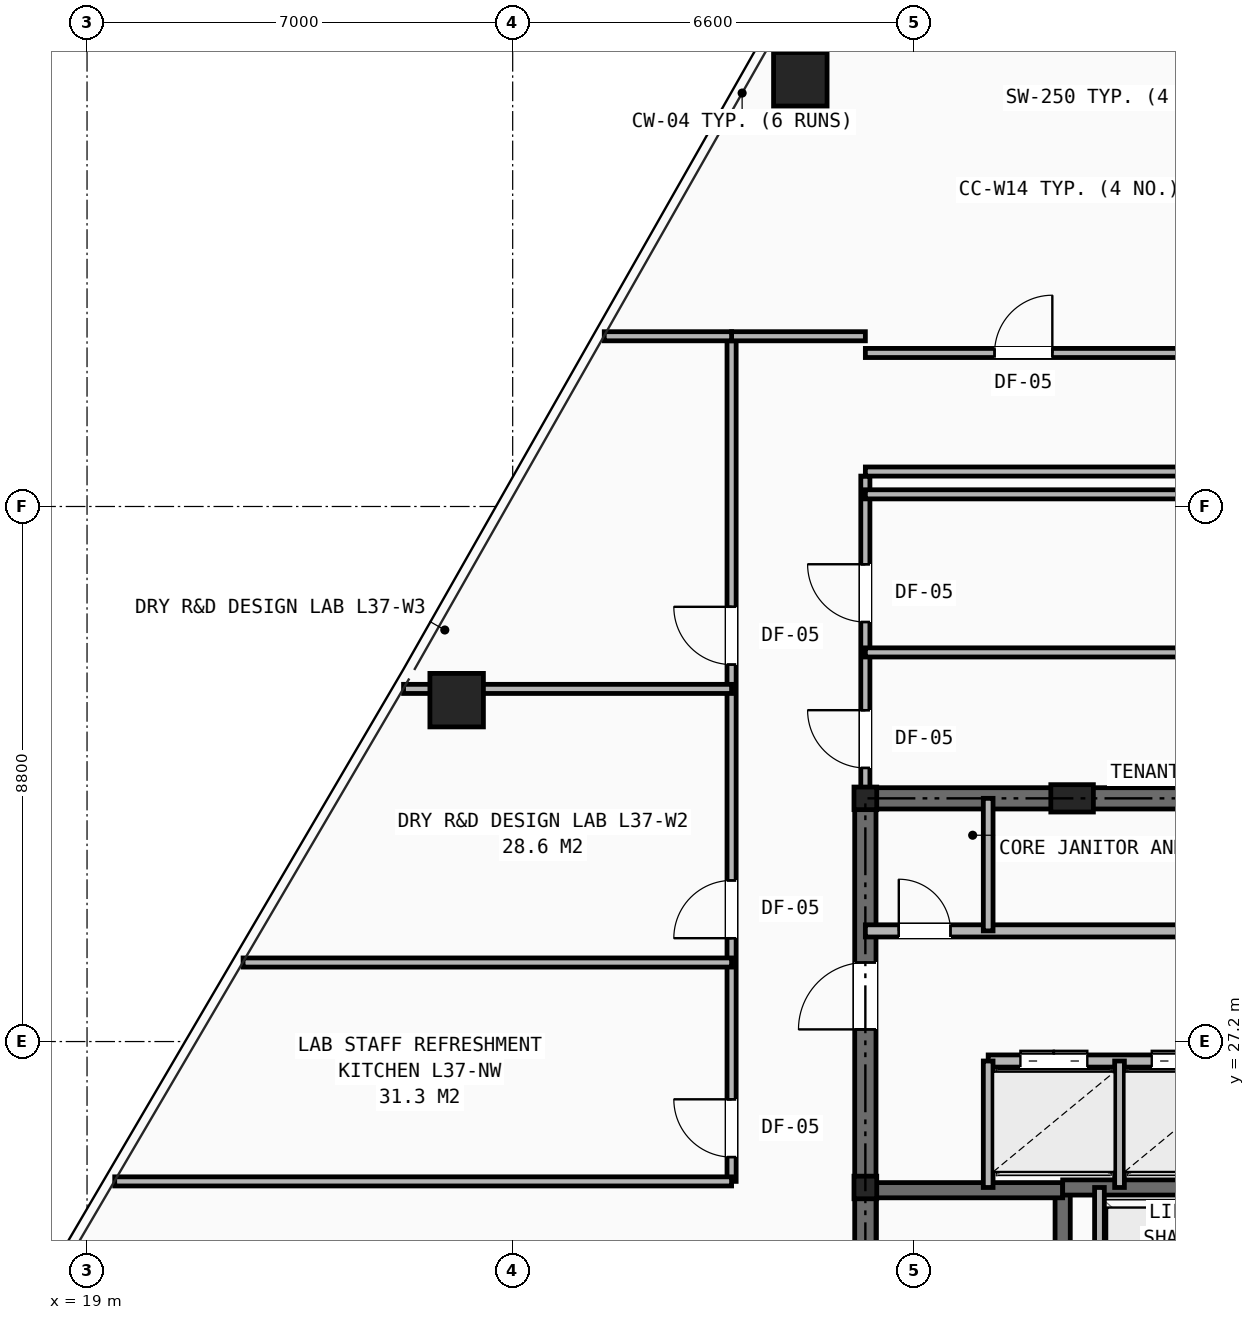
"""IFC4 building model, lengths in metres.
Left out: names, types, materials, properties, quantities, classifications, styles, units other than length and angle.
Written with IfcOpenShell. Run it as: python <this file> out.ifc"""

import sys

from ifc_helpers import new_model, si_unit, direction, frame, frame_2d, origin, origin_2d, place, context, subcontext, project, spatial, rectangle, hollow_rectangle, i_section, extrude, element, fill, save


model = new_model("IFC4")
c1 = context("Model", 3, precision=1e-05, world=origin(), true_north=direction((0.0, 1.0)))
c2 = subcontext(c1, "Body", "Model", "MODEL_VIEW")
j1 = project(units=[si_unit("LENGTHUNIT", "METRE"), si_unit("PLANEANGLEUNIT", "RADIAN")], contexts=[c1])
p1 = place(None, origin())
s1 = spatial("IfcSite", under=j1, at=p1, CompositionType="ELEMENT")
p2 = place(p1, origin())
s2 = spatial("IfcBuilding", under=s1, at=p2, CompositionType="ELEMENT")
p3 = place(p2, frame((0.0, 0.0, 129.8)))
s3 = spatial("IfcBuildingStorey", under=s2, at=p3, CompositionType="ELEMENT", Elevation=129.8)
for number, where, z_axis, x_axis in (
    (1, (31.8, 24.8, 0.0), (0.0, 0.0, 1.0), (1.0, 0.0, 0.0)),
    (2, (31.8, 31.2, 0.0), (0.0, 0.0, 1.0), (1.0, 0.0, 0.0)),
):
    element("IfcColumn", number, at=place(p3, frame(where, z_axis=z_axis, x_axis=x_axis)), inside=s3, PredefinedType="COLUMN", context=c2, shape_type="SweptSolid", body=[
        extrude(i_section(OverallWidth=0.374, OverallDepth=0.372, WebThickness=0.016, FlangeThickness=0.026, at=origin_2d()), origin(), (0.0, 0.0, 1.0), 3.45),
    ])
p4 = place(p3, frame((35.2, 31.2, 0.0), z_axis=(0.0, 0.0, 1.0), x_axis=(1.0, 0.0, 0.0)))
e3 = element("IfcColumn", 3, at=p4, inside=s3, PredefinedType="PILASTER", context=c2, shape_type="SweptSolid", body=[
    extrude(rectangle(XDim=0.7, YDim=0.45, at=origin_2d()), origin(), (0.0, 0.0, 1.0), 3.45),
])
for number, where, z_axis, x_axis in (
    (4, (30.73, 43.026, 0.0), (0.0, 0.0, 1.0), (1.0, 0.0, 0.0)),
    (5, (25.079, 32.815, 0.0), (0.0, 0.0, 1.0), (1.0, 0.0, 0.0)),
):
    element("IfcColumn", number, at=place(p3, frame(where, z_axis=z_axis, x_axis=x_axis)), inside=s3, PredefinedType="COLUMN", context=c2, shape_type="SweptSolid", body=[
        extrude(hollow_rectangle(XDim=0.88, YDim=0.88, WallThickness=0.06, at=origin_2d()), origin(), (0.0, 0.0, 1.0), 3.45),
    ])
p5 = place(p3, frame((31.8, 31.2, 0.0), z_axis=(0.0, 0.0, 1.0), x_axis=(1.0, 0.0, 0.0)))
e6 = element("IfcWall", 6, at=p5, inside=s3, PredefinedType="SHEAR", context=c2, shape_type="SweptSolid", body=[
    extrude(rectangle(XDim=16.4, YDim=0.35, at=frame_2d((8.2, 0.0))), origin(), (0.0, 0.0, 1.0), 3.21),
])
p6 = place(p3, frame((31.8, 16.4, 0.0), z_axis=(0.0, 0.0, 1.0), x_axis=(0.0, 1.0, 0.0)))
e7 = element("IfcWall", 7, at=p6, inside=s3, PredefinedType="SHEAR", context=c2, shape_type="SweptSolid", body=[
    extrude(rectangle(XDim=14.8, YDim=0.35, at=frame_2d((7.4, 0.0))), origin(), (0.0, 0.0, 1.0), 3.21),
])
p7 = place(p6, frame((11.0, 0.0, 0.0)))
e8 = element("IfcOpeningElement", 8, at=p7, cuts=e7, PredefinedType="OPENING", context=c2, shape_type="SweptSolid", body=[
    extrude(rectangle(XDim=1.1, YDim=2.15, at=frame_2d((0.55, 1.075))), frame((0.0, 0.185, 0.0), z_axis=(0.0, -1.0, 0.0), x_axis=(1.0, 0.0, 0.0)), (0.0, 0.0, 1.0), 0.37),
])
p8 = place(p3, frame((35.045, 16.4, 0.0), z_axis=(0.0, 0.0, 1.0), x_axis=(0.0, 1.0, 0.0)))
e9 = element("IfcWall", 9, at=p8, inside=s3, PredefinedType="SHEAR", context=c2, shape_type="SweptSolid", body=[
    extrude(rectangle(XDim=8.4, YDim=0.25, at=frame_2d((4.2, 0.0))), origin(), (0.0, 0.0, 1.0), 3.21),
])
p9 = place(p8, frame((0.45, 0.0, 0.0)))
e10 = element("IfcOpeningElement", 10, at=p9, cuts=e9, PredefinedType="OPENING", context=c2, shape_type="SweptSolid", body=[
    extrude(rectangle(XDim=0.95, YDim=2.1, at=frame_2d((0.475, 1.05))), frame((0.0, 0.135, 0.0), z_axis=(0.0, -1.0, 0.0), x_axis=(1.0, 0.0, 0.0)), (0.0, 0.0, 1.0), 0.27),
])
p10 = place(p3, frame((31.8, 24.755, 0.0), z_axis=(0.0, 0.0, 1.0), x_axis=(1.0, 0.0, 0.0)))
e11 = element("IfcWall", 11, at=p10, inside=s3, PredefinedType="SHEAR", context=c2, shape_type="SweptSolid", body=[
    extrude(rectangle(XDim=3.245, YDim=0.25, at=frame_2d((1.623, 0.0))), origin(), (0.0, 0.0, 1.0), 3.21),
])
p11 = place(p3, frame((35.045, 24.8, 0.0), z_axis=(0.0, 0.0, 1.0), x_axis=(1.0, 0.0, 0.0)))
e12 = element("IfcWall", 12, at=p11, inside=s3, PredefinedType="SHEAR", context=c2, shape_type="SweptSolid", body=[
    extrude(rectangle(XDim=9.91, YDim=0.25, at=frame_2d((4.955, 0.0))), origin(), (0.0, 0.0, 1.0), 3.21),
])
p12 = place(p3, frame((35.65, 22.48, 0.0), z_axis=(0.0, 0.0, 1.0), x_axis=(0.0, 1.0, 0.0)))
e13 = element("IfcWall", 13, at=p12, inside=s3, PredefinedType="SOLIDWALL", context=c2, shape_type="SweptSolid", body=[
    extrude(rectangle(XDim=2.32, YDim=0.16, at=frame_2d((1.16, 0.0))), origin(), (0.0, 0.0, 1.0), 3.21),
])
p13 = place(p3, frame((31.8, 29.02, 0.0), z_axis=(0.0, 0.0, 1.0), x_axis=(1.0, 0.0, 0.0)))
e14 = element("IfcWall", 14, at=p13, inside=s3, PredefinedType="SOLIDWALL", context=c2, shape_type="SweptSolid", body=[
    extrude(rectangle(XDim=16.4, YDim=0.2, at=frame_2d((8.2, 0.0))), origin(), (0.0, 0.0, 1.0), 2.661),
])
p14 = place(p13, frame((0.55, 0.0, 0.0)))
e15 = element("IfcOpeningElement", 15, at=p14, cuts=e14, PredefinedType="OPENING", context=c2, shape_type="SweptSolid", body=[
    extrude(rectangle(XDim=0.85, YDim=2.05, at=frame_2d((0.425, 1.025))), frame((0.0, 0.11, 0.0), z_axis=(0.0, -1.0, 0.0), x_axis=(1.0, 0.0, 0.0)), (0.0, 0.0, 1.0), 0.22),
])
p15 = place(p13, frame((5.94, 0.0, 0.0)))
e16 = element("IfcOpeningElement", 16, at=p15, cuts=e14, PredefinedType="OPENING", context=c2, shape_type="SweptSolid", body=[
    extrude(rectangle(XDim=0.9, YDim=2.1, at=frame_2d((0.45, 1.05))), frame((0.0, 0.11, 0.0), z_axis=(0.0, -1.0, 0.0), x_axis=(1.0, 0.0, 0.0)), (0.0, 0.0, 1.0), 0.22),
])
p16 = place(p3, frame((33.82, 26.88, 0.0), z_axis=(0.0, 0.0, 1.0), x_axis=(1.0, 0.0, 0.0)))
e17 = element("IfcWall", 17, at=p16, inside=s3, PredefinedType="SOLIDWALL", context=c2, shape_type="SweptSolid", body=[
    extrude(rectangle(XDim=14.38, YDim=0.2, at=frame_2d((7.19, 0.0))), origin(), (0.0, 0.0, 1.0), 2.661),
])
p17 = place(p16, frame((0.53, 0.0, 0.0)))
e18 = element("IfcOpeningElement", 18, at=p17, cuts=e17, PredefinedType="OPENING", context=c2, shape_type="SweptSolid", body=[
    extrude(rectangle(XDim=1.1, YDim=2.15, at=frame_2d((0.55, 1.075))), frame((0.0, 0.11, 0.0), z_axis=(0.0, -1.0, 0.0), x_axis=(1.0, 0.0, 0.0)), (0.0, 0.0, 1.0), 0.22),
])
p18 = place(p16, frame((2.69, 0.0, 0.0)))
e19 = element("IfcOpeningElement", 19, at=p18, cuts=e17, PredefinedType="OPENING", context=c2, shape_type="SweptSolid", body=[
    extrude(rectangle(XDim=1.1, YDim=2.15, at=frame_2d((0.55, 1.075))), frame((0.0, 0.11, 0.0), z_axis=(0.0, -1.0, 0.0), x_axis=(1.0, 0.0, 0.0)), (0.0, 0.0, 1.0), 0.22),
])
p19 = place(p16, frame((4.85, 0.0, 0.0)))
e20 = element("IfcOpeningElement", 20, at=p19, cuts=e17, PredefinedType="OPENING", context=c2, shape_type="SweptSolid", body=[
    extrude(rectangle(XDim=1.1, YDim=2.15, at=frame_2d((0.55, 1.075))), frame((0.0, 0.11, 0.0), z_axis=(0.0, -1.0, 0.0), x_axis=(1.0, 0.0, 0.0)), (0.0, 0.0, 1.0), 0.22),
])
p20 = place(p16, frame((7.01, 0.0, 0.0)))
e21 = element("IfcOpeningElement", 21, at=p20, cuts=e17, PredefinedType="OPENING", context=c2, shape_type="SweptSolid", body=[
    extrude(rectangle(XDim=1.1, YDim=2.15, at=frame_2d((0.55, 1.075))), frame((0.0, 0.11, 0.0), z_axis=(0.0, -1.0, 0.0), x_axis=(1.0, 0.0, 0.0)), (0.0, 0.0, 1.0), 0.22),
])
p21 = place(p3, frame((33.82, 29.02, 0.0), z_axis=(0.0, 0.0, 1.0), x_axis=(0.0, 1.0, 0.0)))
e22 = element("IfcWall", 22, at=p21, inside=s3, PredefinedType="SOLIDWALL", context=c2, shape_type="SweptSolid", body=[
    extrude(rectangle(XDim=2.18, YDim=0.16, at=frame_2d((1.09, 0.0))), origin(), (0.0, 0.0, 1.0), 2.661),
])
for number, where, z_axis, x_axis in (
    (23, (33.82, 24.8, 0.0), (0.0, 0.0, 1.0), (0.0, 1.0, 0.0)),
    (24, (35.98, 24.8, 0.0), (0.0, 0.0, 1.0), (0.0, 1.0, 0.0)),
):
    element("IfcWall", number, at=place(p3, frame(where, z_axis=z_axis, x_axis=x_axis)), inside=s3, PredefinedType="SOLIDWALL", context=c2, shape_type="SweptSolid", body=[
        extrude(rectangle(XDim=2.08, YDim=0.16, at=frame_2d((1.04, 0.0))), origin(), (0.0, 0.0, 1.0), 3.21),
    ])
p22 = place(p3, frame((29.6, 24.9, 0.0), z_axis=(0.0, 0.0, 1.0), x_axis=(0.0, 1.0, 0.0)))
e25 = element("IfcWall", 25, at=p22, inside=s3, PredefinedType="PARTITIONING", context=c2, shape_type="SweptSolid", body=[
    extrude(rectangle(XDim=13.9, YDim=0.15, at=frame_2d((6.95, 0.0))), origin(), (0.0, 0.0, 1.0), 2.252),
])
p23 = place(p22, frame((0.4, 0.0, 0.0)))
e26 = element("IfcOpeningElement", 26, at=p23, cuts=e25, PredefinedType="OPENING", context=c2, shape_type="SweptSolid", body=[
    extrude(rectangle(XDim=0.95, YDim=2.1, at=frame_2d((0.475, 1.05))), frame((0.0, 0.085, 0.0), z_axis=(0.0, -1.0, 0.0), x_axis=(1.0, 0.0, 0.0)), (0.0, 0.0, 1.0), 0.17),
])
p24 = place(p22, frame((4.0, 0.0, 0.0)))
e27 = element("IfcOpeningElement", 27, at=p24, cuts=e25, PredefinedType="OPENING", context=c2, shape_type="SweptSolid", body=[
    extrude(rectangle(XDim=0.95, YDim=2.1, at=frame_2d((0.475, 1.05))), frame((0.0, 0.085, 0.0), z_axis=(0.0, -1.0, 0.0), x_axis=(1.0, 0.0, 0.0)), (0.0, 0.0, 1.0), 0.17),
])
p25 = place(p22, frame((8.5, 0.0, 0.0)))
e28 = element("IfcOpeningElement", 28, at=p25, cuts=e25, PredefinedType="OPENING", context=c2, shape_type="SweptSolid", body=[
    extrude(rectangle(XDim=0.95, YDim=2.1, at=frame_2d((0.475, 1.05))), frame((0.0, 0.085, 0.0), z_axis=(0.0, -1.0, 0.0), x_axis=(1.0, 0.0, 0.0)), (0.0, 0.0, 1.0), 0.17),
])
p26 = place(p3, frame((31.8, 31.2, 0.0), z_axis=(0.0, 0.0, 1.0), x_axis=(0.0, 1.0, 0.0)))
e29 = element("IfcWall", 29, at=p26, inside=s3, PredefinedType="PARTITIONING", context=c2, shape_type="SweptSolid", body=[
    extrude(rectangle(XDim=5.3, YDim=0.15, at=frame_2d((2.65, 0.0))), origin(), (0.0, 0.0, 1.0), 2.252),
])
p27 = place(p26, frame((0.5, 0.0, 0.0)))
e30 = element("IfcOpeningElement", 30, at=p27, cuts=e29, PredefinedType="OPENING", context=c2, shape_type="SweptSolid", body=[
    extrude(rectangle(XDim=0.95, YDim=2.1, at=frame_2d((0.475, 1.05))), frame((0.0, 0.085, 0.0), z_axis=(0.0, -1.0, 0.0), x_axis=(1.0, 0.0, 0.0)), (0.0, 0.0, 1.0), 0.17),
])
p28 = place(p26, frame((2.9, 0.0, 0.0)))
e31 = element("IfcOpeningElement", 31, at=p28, cuts=e29, PredefinedType="OPENING", context=c2, shape_type="SweptSolid", body=[
    extrude(rectangle(XDim=0.95, YDim=2.1, at=frame_2d((0.475, 1.05))), frame((0.0, 0.085, 0.0), z_axis=(0.0, -1.0, 0.0), x_axis=(1.0, 0.0, 0.0)), (0.0, 0.0, 1.0), 0.17),
])
p29 = place(p3, frame((29.6, 38.8, 0.0), z_axis=(0.0, 0.0, 1.0), x_axis=(1.0, 0.0, 0.0)))
e32 = element("IfcWall", 32, at=p29, inside=s3, PredefinedType="PARTITIONING", context=c2, shape_type="SweptSolid", body=[
    extrude(rectangle(XDim=2.2, YDim=0.15, at=frame_2d((1.1, 0.0))), origin(), (0.0, 0.0, 1.0), 2.743),
])
p30 = place(p3, frame((19.455, 24.9, 0.0), z_axis=(0.0, 0.0, 1.0), x_axis=(1.0, 0.0, 0.0)))
e33 = element("IfcWall", 33, at=p30, inside=s3, PredefinedType="PARTITIONING", context=c2, shape_type="SweptSolid", body=[
    extrude(rectangle(XDim=10.145, YDim=0.15, at=frame_2d((5.073, 0.0))), origin(), (0.0, 0.0, 1.0), 2.589),
])
p31 = place(p3, frame((27.506, 38.8, 0.0), z_axis=(0.0, 0.0, 1.0), x_axis=(1.0, 0.0, 0.0)))
e34 = element("IfcWall", 34, at=p31, inside=s3, PredefinedType="PARTITIONING", context=c2, shape_type="SweptSolid", body=[
    extrude(rectangle(XDim=2.094, YDim=0.15, at=frame_2d((1.047, 0.0))), origin(), (0.0, 0.0, 1.0), 2.589),
])
p32 = place(p3, frame((21.566, 28.5, 0.0), z_axis=(0.0, 0.0, 1.0), x_axis=(1.0, 0.0, 0.0)))
e35 = element("IfcWall", 35, at=p32, inside=s3, PredefinedType="PARTITIONING", context=c2, shape_type="SweptSolid", body=[
    extrude(rectangle(XDim=8.034, YDim=0.15, at=frame_2d((4.017, 0.0))), origin(), (0.0, 0.0, 1.0), 2.589),
])
p33 = place(p3, frame((24.205, 33.0, 0.0), z_axis=(0.0, 0.0, 1.0), x_axis=(1.0, 0.0, 0.0)))
e36 = element("IfcWall", 36, at=p33, inside=s3, PredefinedType="PARTITIONING", context=c2, shape_type="SweptSolid", body=[
    extrude(rectangle(XDim=5.395, YDim=0.15, at=frame_2d((2.697, 0.0))), origin(), (0.0, 0.0, 1.0), 2.252),
])
p34 = place(p3, frame((31.8, 33.6, 0.0), z_axis=(0.0, 0.0, 1.0), x_axis=(1.0, 0.0, 0.0)))
e37 = element("IfcWall", 37, at=p34, inside=s3, PredefinedType="PARTITIONING", context=c2, shape_type="SweptSolid", body=[
    extrude(rectangle(XDim=23.649, YDim=0.15, at=frame_2d((11.825, 0.0))), origin(), (0.0, 0.0, 1.0), 2.589),
])
p35 = place(p3, frame((31.8, 36.2, 0.0), z_axis=(0.0, 0.0, 1.0), x_axis=(1.0, 0.0, 0.0)))
e38 = element("IfcWall", 38, at=p35, inside=s3, PredefinedType="PARTITIONING", context=c2, shape_type="SweptSolid", body=[
    extrude(rectangle(XDim=22.172, YDim=0.15, at=frame_2d((11.086, 0.0))), origin(), (0.0, 0.0, 1.0), 2.589),
])
p36 = place(p3, frame((31.8, 36.575, 0.0), z_axis=(0.0, 0.0, 1.0), x_axis=(1.0, 0.0, 0.0)))
e39 = element("IfcWall", 39, at=p36, inside=s3, PredefinedType="PARTITIONING", context=c2, shape_type="SweptSolid", body=[
    extrude(rectangle(XDim=9.15, YDim=0.15, at=frame_2d((4.575, 0.0))), origin(), (0.0, 0.0, 1.0), 3.21),
])
p37 = place(p3, frame((31.8, 38.525, 0.0), z_axis=(0.0, 0.0, 1.0), x_axis=(1.0, 0.0, 0.0)))
e40 = element("IfcWall", 40, at=p37, inside=s3, PredefinedType="PARTITIONING", context=c2, shape_type="SweptSolid", body=[
    extrude(rectangle(XDim=6.25, YDim=0.15, at=frame_2d((3.125, 0.0))), origin(), (0.0, 0.0, 1.0), 2.743),
])
p38 = place(p37, frame((2.125, 0.0, 0.0)))
e41 = element("IfcOpeningElement", 41, at=p38, cuts=e40, PredefinedType="OPENING", context=c2, shape_type="SweptSolid", body=[
    extrude(rectangle(XDim=0.95, YDim=2.1, at=frame_2d((0.475, 1.05))), frame((0.0, 0.085, 0.0), z_axis=(0.0, -1.0, 0.0), x_axis=(1.0, 0.0, 0.0)), (0.0, 0.0, 1.0), 0.17),
])
p39 = place(p14, origin())
e42 = element("IfcDoor", 42, at=p39, inside=s3, OperationType="SINGLE_SWING_LEFT", PredefinedType="DOOR", context=c2, shape_type="SweptSolid", body=[
    extrude(rectangle(XDim=0.85, YDim=2.05, at=frame_2d((0.425, 1.025))), frame((0.0, 0.025, 0.0), z_axis=(0.0, -1.0, 0.0), x_axis=(1.0, 0.0, 0.0)), (0.0, 0.0, 1.0), 0.05),
])
fill(e15, e42)
p40 = place(p7, origin())
e43 = element("IfcDoor", 43, at=p40, inside=s3, OperationType="SINGLE_SWING_LEFT", PredefinedType="DOOR", context=c2, shape_type="SweptSolid", body=[
    extrude(rectangle(XDim=1.1, YDim=2.15, at=frame_2d((0.55, 1.075))), frame((0.0, 0.025, 0.0), z_axis=(0.0, -1.0, 0.0), x_axis=(1.0, 0.0, 0.0)), (0.0, 0.0, 1.0), 0.05),
])
fill(e8, e43)
p41 = place(p17, origin())
e44 = element("IfcDoor", 44, at=p41, inside=s3, OperationType="DOUBLE_DOOR_SLIDING", PredefinedType="DOOR", context=c2, shape_type="SweptSolid", body=[
    extrude(rectangle(XDim=1.1, YDim=2.15, at=frame_2d((0.55, 1.075))), frame((0.0, 0.025, 0.0), z_axis=(0.0, -1.0, 0.0), x_axis=(1.0, 0.0, 0.0)), (0.0, 0.0, 1.0), 0.05),
])
fill(e18, e44)
p42 = place(p18, origin())
e45 = element("IfcDoor", 45, at=p42, inside=s3, OperationType="DOUBLE_DOOR_SLIDING", PredefinedType="DOOR", context=c2, shape_type="SweptSolid", body=[
    extrude(rectangle(XDim=1.1, YDim=2.15, at=frame_2d((0.55, 1.075))), frame((0.0, 0.025, 0.0), z_axis=(0.0, -1.0, 0.0), x_axis=(1.0, 0.0, 0.0)), (0.0, 0.0, 1.0), 0.05),
])
fill(e19, e45)
p43 = place(p23, origin())
e46 = element("IfcDoor", 46, at=p43, inside=s3, OperationType="SINGLE_SWING_RIGHT", PredefinedType="DOOR", context=c2, shape_type="SweptSolid", body=[
    extrude(rectangle(XDim=0.95, YDim=2.1, at=frame_2d((0.475, 1.05))), frame((0.0, 0.025, 0.0), z_axis=(0.0, -1.0, 0.0), x_axis=(1.0, 0.0, 0.0)), (0.0, 0.0, 1.0), 0.05),
])
fill(e26, e46)
p44 = place(p24, origin())
e47 = element("IfcDoor", 47, at=p44, inside=s3, OperationType="SINGLE_SWING_LEFT", PredefinedType="DOOR", context=c2, shape_type="SweptSolid", body=[
    extrude(rectangle(XDim=0.95, YDim=2.1, at=frame_2d((0.475, 1.05))), frame((0.0, 0.025, 0.0), z_axis=(0.0, -1.0, 0.0), x_axis=(1.0, 0.0, 0.0)), (0.0, 0.0, 1.0), 0.05),
])
fill(e27, e47)
p45 = place(p25, origin())
e48 = element("IfcDoor", 48, at=p45, inside=s3, OperationType="SINGLE_SWING_RIGHT", PredefinedType="DOOR", context=c2, shape_type="SweptSolid", body=[
    extrude(rectangle(XDim=0.95, YDim=2.1, at=frame_2d((0.475, 1.05))), frame((0.0, 0.025, 0.0), z_axis=(0.0, -1.0, 0.0), x_axis=(1.0, 0.0, 0.0)), (0.0, 0.0, 1.0), 0.05),
])
fill(e28, e48)
p46 = place(p27, origin())
e49 = element("IfcDoor", 49, at=p46, inside=s3, OperationType="SINGLE_SWING_RIGHT", PredefinedType="DOOR", context=c2, shape_type="SweptSolid", body=[
    extrude(rectangle(XDim=0.95, YDim=2.1, at=frame_2d((0.475, 1.05))), frame((0.0, 0.025, 0.0), z_axis=(0.0, -1.0, 0.0), x_axis=(1.0, 0.0, 0.0)), (0.0, 0.0, 1.0), 0.05),
])
fill(e30, e49)
p47 = place(p28, origin())
e50 = element("IfcDoor", 50, at=p47, inside=s3, OperationType="SINGLE_SWING_RIGHT", PredefinedType="DOOR", context=c2, shape_type="SweptSolid", body=[
    extrude(rectangle(XDim=0.95, YDim=2.1, at=frame_2d((0.475, 1.05))), frame((0.0, 0.025, 0.0), z_axis=(0.0, -1.0, 0.0), x_axis=(1.0, 0.0, 0.0)), (0.0, 0.0, 1.0), 0.05),
])
fill(e31, e50)
p48 = place(p38, origin())
e51 = element("IfcDoor", 51, at=p48, inside=s3, OperationType="SINGLE_SWING_RIGHT", PredefinedType="DOOR", context=c2, shape_type="SweptSolid", body=[
    extrude(rectangle(XDim=0.95, YDim=2.1, at=frame_2d((0.475, 1.05))), frame((0.0, 0.025, 0.0), z_axis=(0.0, -1.0, 0.0), x_axis=(1.0, 0.0, 0.0)), (0.0, 0.0, 1.0), 0.05),
])
fill(e41, e51)
save(model, sys.argv[1])
